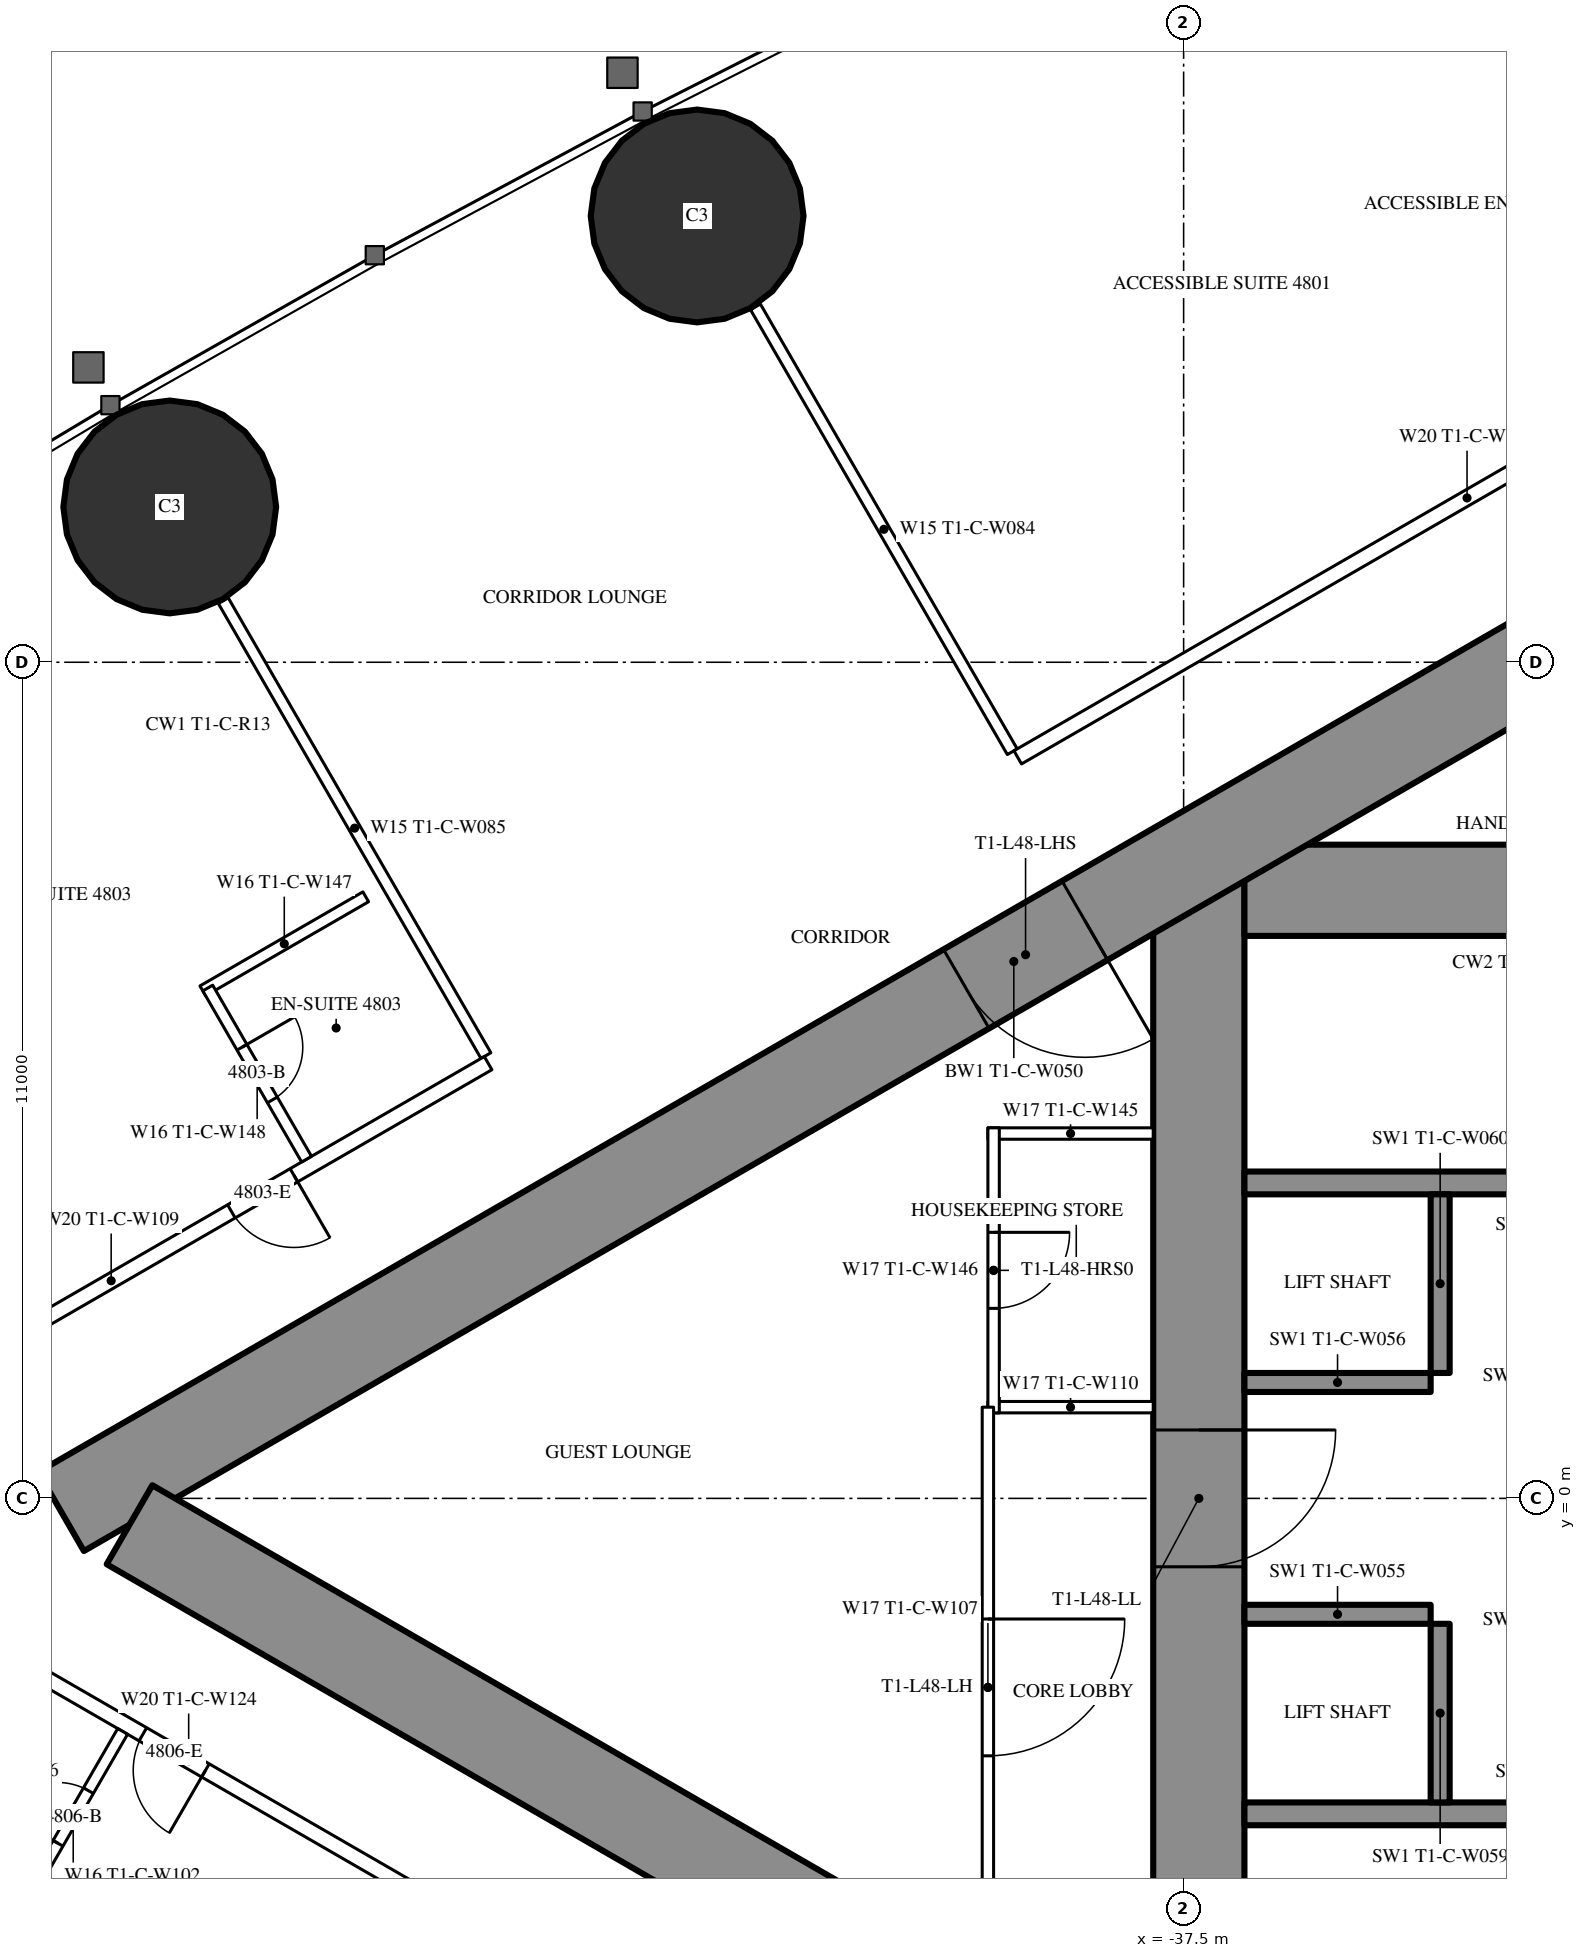
"""IFC4 building model, lengths in metres.
Left out: names, types, materials, properties, quantities, classifications, styles, units other than length and angle.
Written with IfcOpenShell. Run it as: python <this file> out.ifc"""

import sys

from ifc_helpers import new_model, si_unit, direction, frame, frame_2d, origin, origin_2d, place, context, subcontext, project, spatial, rectangle, circle, extrude, element, fill, save


model = new_model("IFC4")
c1 = context("Model", 3, precision=1e-05, world=origin(), true_north=direction((0.0, 1.0)))
c2 = subcontext(c1, "Body", "Model", "MODEL_VIEW")
j1 = project(units=[si_unit("LENGTHUNIT", "METRE"), si_unit("PLANEANGLEUNIT", "RADIAN")], contexts=[c1])
p1 = place(None, origin())
s1 = spatial("IfcSite", under=j1, at=p1, CompositionType="ELEMENT")
p2 = place(p1, origin())
s2 = spatial("IfcBuilding", under=s1, at=p2, CompositionType="ELEMENT")
p3 = place(p2, frame((0.0, 0.0, 180.8)))
s3 = spatial("IfcBuildingStorey", under=s2, at=p3, CompositionType="ELEMENT", Elevation=180.8)
for number, where, z_axis, x_axis in (
    (1, (-43.9, 16.871, 0.0), (0.0, 0.0, 1.0), (1.0, 0.0, 0.0)),
    (2, (-50.839, 13.043, 0.0), (0.0, 0.0, 1.0), (1.0, 0.0, 0.0)),
):
    element("IfcColumn", number, at=place(p3, frame(where, z_axis=z_axis, x_axis=x_axis)), inside=s3, PredefinedType="COLUMN", context=c2, shape_type="SweptSolid", body=[
        extrude(circle(Radius=1.4, at=origin_2d()), origin(), (0.0, 0.0, 1.0), 3.5),
    ])
p4 = place(p3, frame((-37.3, 8.6, 0.0), z_axis=(0.0, 0.0, 1.0), x_axis=(0.0, -1.0, 0.0)))
e3 = element("IfcWall", 3, at=p4, inside=s3, PredefinedType="SHEAR", context=c2, shape_type="SweptSolid", body=[
    extrude(rectangle(XDim=17.2, YDim=1.2, at=frame_2d((8.6, 0.0))), origin(), (0.0, 0.0, 1.0), 3.5),
])
p5 = place(p4, frame((7.7, 0.0, 0.0)))
e4 = element("IfcOpeningElement", 4, at=p5, cuts=e3, PredefinedType="OPENING", context=c2, shape_type="SweptSolid", body=[
    extrude(rectangle(XDim=1.8, YDim=2.2, at=frame_2d((0.9, 1.1))), frame((0.0, 0.61, 0.0), z_axis=(0.0, -1.0, 0.0), x_axis=(1.0, 0.0, 0.0)), (0.0, 0.0, 1.0), 1.22),
])
p6 = place(p3, frame((-28.3, 8.0, 0.0), z_axis=(0.0, 0.0, 1.0), x_axis=(-1.0, 0.0, 0.0)))
e5 = element("IfcWall", 5, at=p6, inside=s3, PredefinedType="SHEAR", context=c2, shape_type="SweptSolid", body=[
    extrude(rectangle(XDim=8.4, YDim=1.2, at=frame_2d((4.2, 0.0))), origin(), (0.0, 0.0, 1.0), 3.5),
])
p7 = place(p6, frame((0.25, 0.0, 0.0)))
e6 = element("IfcOpeningElement", 6, at=p7, cuts=e5, PredefinedType="OPENING", context=c2, shape_type="SweptSolid", body=[
    extrude(rectangle(XDim=1.0, YDim=2.2, at=frame_2d((0.5, 1.1))), frame((0.0, 0.61, 0.0), z_axis=(0.0, -1.0, 0.0), x_axis=(1.0, 0.0, 0.0)), (0.0, 0.0, 1.0), 1.22),
])
for number, where, z_axis, x_axis in (
    (7, (-28.3, 4.15, 0.0), (0.0, 0.0, 1.0), (-1.0, 0.0, 0.0)),
    (8, (-28.3, -4.15, 0.0), (0.0, 0.0, 1.0), (-1.0, 0.0, 0.0)),
):
    element("IfcWall", number, at=place(p3, frame(where, z_axis=z_axis, x_axis=x_axis)), inside=s3, PredefinedType="SHEAR", context=c2, shape_type="SweptSolid", body=[
        extrude(rectangle(XDim=8.4, YDim=0.3, at=frame_2d((4.2, 0.0))), origin(), (0.0, 0.0, 1.0), 3.5),
    ])
p8 = place(p3, frame((-34.125, 4.0, 0.0), z_axis=(0.0, 0.0, 1.0), x_axis=(0.0, -1.0, 0.0)))
e9 = element("IfcWall", 9, at=p8, inside=s3, PredefinedType="SHEAR", context=c2, shape_type="SweptSolid", body=[
    extrude(rectangle(XDim=2.35, YDim=0.25, at=frame_2d((1.175, 0.0))), origin(), (0.0, 0.0, 1.0), 3.5),
])
p9 = place(p3, frame((-34.25, 1.525, 0.0), z_axis=(0.0, 0.0, 1.0), x_axis=(-1.0, 0.0, 0.0)))
e10 = element("IfcWall", 10, at=p9, inside=s3, PredefinedType="SHEAR", context=c2, shape_type="SweptSolid", body=[
    extrude(rectangle(XDim=2.45, YDim=0.25, at=frame_2d((1.225, 0.0))), origin(), (0.0, 0.0, 1.0), 3.5),
])
p10 = place(p3, frame((-34.125, -1.65, 0.0), z_axis=(0.0, 0.0, 1.0), x_axis=(0.0, -1.0, 0.0)))
e11 = element("IfcWall", 11, at=p10, inside=s3, PredefinedType="SHEAR", context=c2, shape_type="SweptSolid", body=[
    extrude(rectangle(XDim=2.35, YDim=0.25, at=frame_2d((1.175, 0.0))), origin(), (0.0, 0.0, 1.0), 3.5),
])
p11 = place(p3, frame((-34.25, -1.525, 0.0), z_axis=(0.0, 0.0, 1.0), x_axis=(-1.0, 0.0, 0.0)))
e12 = element("IfcWall", 12, at=p11, inside=s3, PredefinedType="SHEAR", context=c2, shape_type="SweptSolid", body=[
    extrude(rectangle(XDim=2.45, YDim=0.25, at=frame_2d((1.225, 0.0))), origin(), (0.0, 0.0, 1.0), 3.5),
])
p12 = place(p3, frame((-27.2, 14.3, 0.0), z_axis=(0.0, 0.0, 1.0), x_axis=(-0.866026593062, -0.499997940104, 0.0)))
e13 = element("IfcWall", 13, at=p12, inside=s3, PredefinedType="SHEAR", context=c2, shape_type="SweptSolid", body=[
    extrude(rectangle(XDim=28.946, YDim=1.2, at=frame_2d((14.473, 0.0))), origin(), (0.0, 0.0, 1.0), 3.5),
])
p13 = place(p12, frame((4.6, 0.0, 0.0)))
e14 = element("IfcOpeningElement", 14, at=p13, cuts=e13, PredefinedType="OPENING", context=c2, shape_type="SweptSolid", body=[
    extrude(rectangle(XDim=1.0, YDim=2.2, at=frame_2d((0.5, 1.1))), frame((0.0, 0.61, 0.0), z_axis=(0.0, -1.0, 0.0), x_axis=(1.0, 0.0, 0.0)), (0.0, 0.0, 1.0), 1.22),
])
p14 = place(p12, frame((13.395, 0.0, 0.0)))
e15 = element("IfcOpeningElement", 15, at=p14, cuts=e13, PredefinedType="OPENING", context=c2, shape_type="SweptSolid", body=[
    extrude(rectangle(XDim=1.8, YDim=2.2, at=frame_2d((0.9, 1.1))), frame((0.0, 0.61, 0.0), z_axis=(0.0, -1.0, 0.0), x_axis=(1.0, 0.0, 0.0)), (0.0, 0.0, 1.0), 1.22),
])
p15 = place(p3, frame((-27.2, -14.3, 0.0), z_axis=(0.0, 0.0, 1.0), x_axis=(-0.866024021859, 0.500002393557, 0.0)))
e16 = element("IfcWall", 16, at=p15, inside=s3, PredefinedType="SHEAR", context=c2, shape_type="SweptSolid", body=[
    extrude(rectangle(XDim=27.907, YDim=1.2, at=frame_2d((13.954, 0.0))), origin(), (0.0, 0.0, 1.0), 3.5),
])
p16 = place(p15, frame((4.6, 0.0, 0.0)))
e17 = element("IfcOpeningElement", 17, at=p16, cuts=e16, PredefinedType="OPENING", context=c2, shape_type="SweptSolid", body=[
    extrude(rectangle(XDim=1.0, YDim=2.2, at=frame_2d((0.5, 1.1))), frame((0.0, 0.61, 0.0), z_axis=(0.0, -1.0, 0.0), x_axis=(1.0, 0.0, 0.0)), (0.0, 0.0, 1.0), 1.22),
])
p17 = place(p15, frame((13.395, 0.0, 0.0)))
e18 = element("IfcOpeningElement", 18, at=p17, cuts=e16, PredefinedType="OPENING", context=c2, shape_type="SweptSolid", body=[
    extrude(rectangle(XDim=1.8, YDim=2.2, at=frame_2d((0.9, 1.1))), frame((0.0, 0.61, 0.0), z_axis=(0.0, -1.0, 0.0), x_axis=(1.0, 0.0, 0.0)), (0.0, 0.0, 1.0), 1.22),
])
p18 = place(p3, frame((-39.754, 9.823, 0.0), z_axis=(0.0, 0.0, 1.0), x_axis=(-0.499997670926, 0.866026748472, 0.0)))
e19 = element("IfcWall", 19, at=p18, inside=s3, PredefinedType="PARTITIONING", context=c2, shape_type="SweptSolid", body=[
    extrude(rectangle(XDim=6.757, YDim=0.15, at=frame_2d((3.379, 0.0))), origin(), (0.0, 0.0, 1.0), 2.3),
])
p19 = place(p3, frame((-46.679, 5.825, 0.0), z_axis=(0.0, 0.0, 1.0), x_axis=(-0.500006839597, 0.866021454905, 0.0)))
e20 = element("IfcWall", 20, at=p19, inside=s3, PredefinedType="PARTITIONING", context=c2, shape_type="SweptSolid", body=[
    extrude(rectangle(XDim=6.911, YDim=0.15, at=frame_2d((3.456, 0.0))), origin(), (0.0, 0.0, 1.0), 2.3),
])
p20 = place(p3, frame((-44.715, -6.844, 0.0), z_axis=(0.0, 0.0, 1.0), x_axis=(-0.866025261224, 0.500000246922, 0.0)))
e21 = element("IfcWall", 21, at=p20, inside=s3, PredefinedType="PARTITIONING", context=c2, shape_type="SweptSolid", body=[
    extrude(rectangle(XDim=13.567, YDim=0.2, at=frame_2d((6.783, 0.0))), origin(), (0.0, 0.0, 1.0), 3.25),
])
p21 = place(p20, frame((10.579, 0.0, 0.0)))
e22 = element("IfcOpeningElement", 22, at=p21, cuts=e21, PredefinedType="OPENING", context=c2, shape_type="SweptSolid", body=[
    extrude(rectangle(XDim=0.95, YDim=2.2, at=frame_2d((0.475, 1.1))), frame((0.0, 0.11, 0.0), z_axis=(0.0, -1.0, 0.0), x_axis=(1.0, 0.0, 0.0)), (0.0, 0.0, 1.0), 0.22),
])
p22 = place(p20, frame((6.529, 0.0, 0.0)))
e23 = element("IfcOpeningElement", 23, at=p22, cuts=e21, PredefinedType="OPENING", context=c2, shape_type="SweptSolid", body=[
    extrude(rectangle(XDim=0.95, YDim=2.2, at=frame_2d((0.475, 1.1))), frame((0.0, 0.11, 0.0), z_axis=(0.0, -1.0, 0.0), x_axis=(1.0, 0.0, 0.0)), (0.0, 0.0, 1.0), 0.22),
])
p23 = place(p20, frame((0.5, 0.0, 0.0)))
e24 = element("IfcOpeningElement", 24, at=p23, cuts=e21, PredefinedType="OPENING", context=c2, shape_type="SweptSolid", body=[
    extrude(rectangle(XDim=1.435, YDim=2.2, at=frame_2d((0.718, 1.1))), frame((0.0, 0.11, 0.0), z_axis=(0.0, -1.0, 0.0), x_axis=(1.0, 0.0, 0.0)), (0.0, 0.0, 1.0), 0.22),
])
p24 = place(p3, frame((-27.86, 16.575, 0.0), z_axis=(0.0, 0.0, 1.0), x_axis=(-0.866026850238, -0.499997494661, 0.0)))
e25 = element("IfcWall", 25, at=p24, inside=s3, PredefinedType="PARTITIONING", context=c2, shape_type="SweptSolid", body=[
    extrude(rectangle(XDim=13.651, YDim=0.2, at=frame_2d((6.826, 0.0))), origin(), (0.0, 0.0, 1.0), 3.25),
])
p25 = place(p24, frame((3.75, 0.0, 0.0)))
e26 = element("IfcOpeningElement", 26, at=p25, cuts=e25, PredefinedType="OPENING", context=c2, shape_type="SweptSolid", body=[
    extrude(rectangle(XDim=1.0, YDim=2.2, at=frame_2d((0.5, 1.1))), frame((0.0, 0.11, 0.0), z_axis=(0.0, -1.0, 0.0), x_axis=(1.0, 0.0, 0.0)), (0.0, 0.0, 1.0), 0.22),
])
p26 = place(p3, frame((-46.65, 5.726, 0.0), z_axis=(0.0, 0.0, 1.0), x_axis=(-0.866027963864, -0.499995565786, 0.0)))
e27 = element("IfcWall", 27, at=p26, inside=s3, PredefinedType="PARTITIONING", context=c2, shape_type="SweptSolid", body=[
    extrude(rectangle(XDim=11.452, YDim=0.2, at=frame_2d((5.726, 0.0))), origin(), (0.0, 0.0, 1.0), 3.25),
])
p27 = place(p26, frame((2.95, 0.0, 0.0)))
e28 = element("IfcOpeningElement", 28, at=p27, cuts=e27, PredefinedType="OPENING", context=c2, shape_type="SweptSolid", body=[
    extrude(rectangle(XDim=0.95, YDim=2.2, at=frame_2d((0.475, 1.1))), frame((0.0, 0.11, 0.0), z_axis=(0.0, -1.0, 0.0), x_axis=(1.0, 0.0, 0.0)), (0.0, 0.0, 1.0), 0.22),
])
p28 = place(p26, frame((8.344, 0.0, 0.0)))
e29 = element("IfcOpeningElement", 29, at=p28, cuts=e27, PredefinedType="OPENING", context=c2, shape_type="SweptSolid", body=[
    extrude(rectangle(XDim=0.95, YDim=2.2, at=frame_2d((0.475, 1.1))), frame((0.0, 0.11, 0.0), z_axis=(0.0, -1.0, 0.0), x_axis=(1.0, 0.0, 0.0)), (0.0, 0.0, 1.0), 0.22),
])
p29 = place(p3, frame((-48.26, 7.914, 0.0), z_axis=(0.0, 0.0, 1.0), x_axis=(-0.866031185235, -0.4999899861, 0.0)))
e30 = element("IfcWall", 30, at=p29, inside=s3, PredefinedType="PARTITIONING", context=c2, shape_type="SweptSolid", body=[
    extrude(rectangle(XDim=2.475, YDim=0.15, at=frame_2d((1.238, 0.0))), origin(), (0.0, 0.0, 1.0), 3.25),
])
p30 = place(p3, frame((-49.039, 4.463, 0.0), z_axis=(0.0, 0.0, 1.0), x_axis=(-0.499936506574, 0.866062058628, 0.0)))
e31 = element("IfcWall", 31, at=p30, inside=s3, PredefinedType="PARTITIONING", context=c2, shape_type="SweptSolid", body=[
    extrude(rectangle(XDim=2.6, YDim=0.15, at=frame_2d((1.3, 0.0))), origin(), (0.0, 0.0, 1.0), 3.25),
])
p31 = place(p30, frame((0.9, 0.0, 0.0)))
e32 = element("IfcOpeningElement", 32, at=p31, cuts=e31, PredefinedType="OPENING", context=c2, shape_type="SweptSolid", body=[
    extrude(rectangle(XDim=0.8, YDim=2.2, at=frame_2d((0.4, 1.1))), frame((0.0, 0.085, 0.0), z_axis=(0.0, -1.0, 0.0), x_axis=(1.0, 0.0, 0.0)), (0.0, 0.0, 1.0), 0.17),
])
p32 = place(p3, frame((-51.459, -3.065, 0.0), z_axis=(0.0, 0.0, 1.0), x_axis=(-0.499936506574, -0.866062058628, 0.0)))
e33 = element("IfcWall", 33, at=p32, inside=s3, PredefinedType="PARTITIONING", context=c2, shape_type="SweptSolid", body=[
    extrude(rectangle(XDim=2.6, YDim=0.15, at=frame_2d((1.3, 0.0))), origin(), (0.0, 0.0, 1.0), 3.25),
])
p33 = place(p32, frame((0.9, 0.0, 0.0)))
e34 = element("IfcOpeningElement", 34, at=p33, cuts=e33, PredefinedType="OPENING", context=c2, shape_type="SweptSolid", body=[
    extrude(rectangle(XDim=0.8, YDim=2.2, at=frame_2d((0.4, 1.1))), frame((0.0, 0.085, 0.0), z_axis=(0.0, -1.0, 0.0), x_axis=(1.0, 0.0, 0.0)), (0.0, 0.0, 1.0), 0.17),
])
for number, where, z_axis, x_axis in (
    (35, (-37.9, 1.2, 0.0), (0.0, 0.0, 1.0), (-1.0, 0.0, 0.0)),
    (36, (-37.9, 4.8, 0.0), (0.0, 0.0, 1.0), (-1.0, 0.0, 0.0)),
):
    element("IfcWall", number, at=place(p3, frame(where, z_axis=z_axis, x_axis=x_axis)), inside=s3, PredefinedType="PARTITIONING", context=c2, shape_type="SweptSolid", body=[
        extrude(rectangle(XDim=2.175, YDim=0.15, at=frame_2d((1.087, 0.0))), origin(), (0.0, 0.0, 1.0), 3.25),
    ])
p34 = place(p3, frame((-40.0, 4.875, 0.0), z_axis=(0.0, 0.0, 1.0), x_axis=(0.0, -1.0, 0.0)))
e37 = element("IfcWall", 37, at=p34, inside=s3, PredefinedType="PARTITIONING", context=c2, shape_type="SweptSolid", body=[
    extrude(rectangle(XDim=3.75, YDim=0.15, at=frame_2d((1.875, 0.0))), origin(), (0.0, 0.0, 1.0), 3.25),
])
p35 = place(p34, frame((1.375, 0.0, 0.0)))
e38 = element("IfcOpeningElement", 38, at=p35, cuts=e37, PredefinedType="OPENING", context=c2, shape_type="SweptSolid", body=[
    extrude(rectangle(XDim=1.0, YDim=2.2, at=frame_2d((0.5, 1.1))), frame((0.0, 0.085, 0.0), z_axis=(0.0, -1.0, 0.0), x_axis=(1.0, 0.0, 0.0)), (0.0, 0.0, 1.0), 0.17),
])
p36 = place(p3, frame((-40.075, 1.2, 0.0), z_axis=(0.0, 0.0, 1.0), x_axis=(0.0, -1.0, 0.0)))
e39 = element("IfcWall", 39, at=p36, inside=s3, PredefinedType="PARTITIONING", context=c2, shape_type="SweptSolid", body=[
    extrude(rectangle(XDim=7.374, YDim=0.15, at=frame_2d((3.687, 0.0))), origin(), (0.0, 0.0, 1.0), 3.25),
])
p37 = place(p36, frame((2.787, 0.0, 0.0)))
e40 = element("IfcOpeningElement", 40, at=p37, cuts=e39, PredefinedType="OPENING", context=c2, shape_type="SweptSolid", body=[
    extrude(rectangle(XDim=1.8, YDim=2.2, at=frame_2d((0.9, 1.1))), frame((0.0, 0.085, 0.0), z_axis=(0.0, -1.0, 0.0), x_axis=(1.0, 0.0, 0.0)), (0.0, 0.0, 1.0), 0.17),
])
p38 = place(p31, origin())
e41 = element("IfcDoor", 41, at=p38, inside=s3, OperationType="SINGLE_SWING_RIGHT", PredefinedType="DOOR", context=c2, shape_type="SweptSolid", body=[
    extrude(rectangle(XDim=0.8, YDim=2.2, at=frame_2d((0.4, 1.1))), frame((0.0, 0.025, 0.0), z_axis=(0.0, -1.0, 0.0), x_axis=(1.0, 0.0, 0.0)), (0.0, 0.0, 1.0), 0.05),
])
fill(e32, e41)
p39 = place(p27, origin())
e42 = element("IfcDoor", 42, at=p39, inside=s3, OperationType="SINGLE_SWING_LEFT", PredefinedType="DOOR", context=c2, shape_type="SweptSolid", body=[
    extrude(rectangle(XDim=0.95, YDim=2.2, at=frame_2d((0.475, 1.1))), frame((0.0, 0.025, 0.0), z_axis=(0.0, -1.0, 0.0), x_axis=(1.0, 0.0, 0.0)), (0.0, 0.0, 1.0), 0.05),
])
fill(e28, e42)
p40 = place(p33, origin())
e43 = element("IfcDoor", 43, at=p40, inside=s3, OperationType="SINGLE_SWING_RIGHT", PredefinedType="DOOR", context=c2, shape_type="SweptSolid", body=[
    extrude(rectangle(XDim=0.8, YDim=2.2, at=frame_2d((0.4, 1.1))), frame((0.0, 0.025, 0.0), z_axis=(0.0, -1.0, 0.0), x_axis=(1.0, 0.0, 0.0)), (0.0, 0.0, 1.0), 0.05),
])
fill(e34, e43)
p41 = place(p22, origin())
e44 = element("IfcDoor", 44, at=p41, inside=s3, OperationType="SINGLE_SWING_LEFT", PredefinedType="DOOR", context=c2, shape_type="SweptSolid", body=[
    extrude(rectangle(XDim=0.95, YDim=2.2, at=frame_2d((0.475, 1.1))), frame((0.0, 0.025, 0.0), z_axis=(0.0, -1.0, 0.0), x_axis=(1.0, 0.0, 0.0)), (0.0, 0.0, 1.0), 0.05),
])
fill(e23, e44)
p42 = place(p35, origin())
e45 = element("IfcDoor", 45, at=p42, inside=s3, OperationType="SINGLE_SWING_LEFT", PredefinedType="DOOR", context=c2, shape_type="SweptSolid", body=[
    extrude(rectangle(XDim=1.0, YDim=2.2, at=frame_2d((0.5, 1.1))), frame((0.0, 0.025, 0.0), z_axis=(0.0, -1.0, 0.0), x_axis=(1.0, 0.0, 0.0)), (0.0, 0.0, 1.0), 0.05),
])
fill(e38, e45)
p43 = place(p37, origin())
e46 = element("IfcDoor", 46, at=p43, inside=s3, OperationType="DOUBLE_DOOR_SINGLE_SWING", PredefinedType="DOOR", context=c2, shape_type="SweptSolid", body=[
    extrude(rectangle(XDim=1.8, YDim=2.2, at=frame_2d((0.9, 1.1))), frame((0.0, 0.025, 0.0), z_axis=(0.0, -1.0, 0.0), x_axis=(1.0, 0.0, 0.0)), (0.0, 0.0, 1.0), 0.05),
])
fill(e40, e46)
p44 = place(p14, origin())
e47 = element("IfcDoor", 47, at=p44, inside=s3, OperationType="DOUBLE_DOOR_SINGLE_SWING", PredefinedType="DOOR", context=c2, shape_type="SweptSolid", body=[
    extrude(rectangle(XDim=1.8, YDim=2.2, at=frame_2d((0.9, 1.1))), frame((0.0, 0.025, 0.0), z_axis=(0.0, -1.0, 0.0), x_axis=(1.0, 0.0, 0.0)), (0.0, 0.0, 1.0), 0.05),
])
fill(e15, e47)
p45 = place(p5, origin())
e48 = element("IfcDoor", 48, at=p45, inside=s3, OperationType="DOUBLE_DOOR_SINGLE_SWING", PredefinedType="DOOR", context=c2, shape_type="SweptSolid", body=[
    extrude(rectangle(XDim=1.8, YDim=2.2, at=frame_2d((0.9, 1.1))), frame((0.0, 0.025, 0.0), z_axis=(0.0, -1.0, 0.0), x_axis=(1.0, 0.0, 0.0)), (0.0, 0.0, 1.0), 0.05),
])
fill(e4, e48)
save(model, sys.argv[1])
